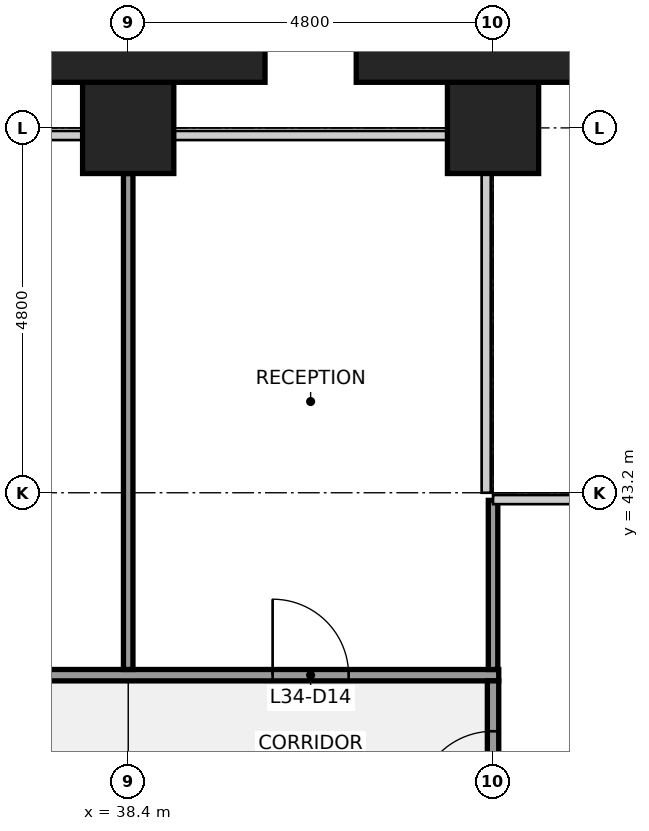
"""IFC4 building model, lengths in metres.
Left out: names, types, materials, properties, quantities, classifications, styles, units other than length and angle.
Written with IfcOpenShell. Run it as: python <this file> out.ifc"""

import sys

from ifc_helpers import new_model, si_unit, direction, frame, frame_2d, origin, origin_2d, place, context, subcontext, project, spatial, rectangle, extrude, element, fill, save


model = new_model("IFC4")
c1 = context("Model", 3, precision=1e-05, world=origin(), true_north=direction((0.0, 1.0)))
c2 = subcontext(c1, "Body", "Model", "MODEL_VIEW")
j1 = project(units=[si_unit("LENGTHUNIT", "METRE"), si_unit("PLANEANGLEUNIT", "RADIAN")], contexts=[c1])
p1 = place(None, origin())
s1 = spatial("IfcSite", under=j1, at=p1, CompositionType="ELEMENT")
p2 = place(p1, origin())
s2 = spatial("IfcBuilding", under=s1, at=p2, CompositionType="ELEMENT")
p3 = place(p2, frame((0.0, 0.0, 156.1)))
s3 = spatial("IfcBuildingStorey", under=s2, at=p3, CompositionType="ELEMENT", Elevation=156.1)
for number, where, z_axis, x_axis in (
    (1, (38.4, 48.0, 0.0), (0.0, 0.0, 1.0), (1.0, 0.0, 0.0)),
    (2, (43.2, 48.0, 0.0), (0.0, 0.0, 1.0), (1.0, 0.0, 0.0)),
):
    element("IfcColumn", number, at=place(p3, frame(where, z_axis=z_axis, x_axis=x_axis)), inside=s3, PredefinedType="COLUMN", context=c2, shape_type="SweptSolid", body=[
        extrude(rectangle(XDim=1.2, YDim=1.2, at=origin_2d()), origin(), (0.0, 0.0, 1.0), 4.0),
    ])
p4 = place(p3, frame((14.325, 40.8, 0.0), z_axis=(0.0, 0.0, 1.0), x_axis=(1.0, 0.0, 0.0)))
e3 = element("IfcWall", 3, at=p4, inside=s3, PredefinedType="PARTITIONING", context=c2, shape_type="SweptSolid", body=[
    extrude(rectangle(XDim=28.95, YDim=0.15, at=frame_2d((14.475, 0.0))), origin(), (0.0, 0.0, 1.0), 2.936),
])
p5 = place(p4, frame((1.975, 0.0, 0.0)))
e4 = element("IfcOpeningElement", 4, at=p5, cuts=e3, PredefinedType="OPENING", context=c2, shape_type="SweptSolid", body=[
    extrude(rectangle(XDim=1.0, YDim=2.1, at=frame_2d((0.5, 1.05))), frame((0.0, 0.085, 0.0), z_axis=(0.0, -1.0, 0.0), x_axis=(1.0, 0.0, 0.0)), (0.0, 0.0, 1.0), 0.17),
])
p6 = place(p4, frame((7.975, 0.0, 0.0)))
e5 = element("IfcOpeningElement", 5, at=p6, cuts=e3, PredefinedType="OPENING", context=c2, shape_type="SweptSolid", body=[
    extrude(rectangle(XDim=1.0, YDim=2.1, at=frame_2d((0.5, 1.05))), frame((0.0, 0.085, 0.0), z_axis=(0.0, -1.0, 0.0), x_axis=(1.0, 0.0, 0.0)), (0.0, 0.0, 1.0), 0.17),
])
p7 = place(p4, frame((15.175, 0.0, 0.0)))
e6 = element("IfcOpeningElement", 6, at=p7, cuts=e3, PredefinedType="OPENING", context=c2, shape_type="SweptSolid", body=[
    extrude(rectangle(XDim=1.0, YDim=2.1, at=frame_2d((0.5, 1.05))), frame((0.0, 0.085, 0.0), z_axis=(0.0, -1.0, 0.0), x_axis=(1.0, 0.0, 0.0)), (0.0, 0.0, 1.0), 0.17),
])
p8 = place(p4, frame((21.175, 0.0, 0.0)))
e7 = element("IfcOpeningElement", 7, at=p8, cuts=e3, PredefinedType="OPENING", context=c2, shape_type="SweptSolid", body=[
    extrude(rectangle(XDim=1.0, YDim=2.1, at=frame_2d((0.5, 1.05))), frame((0.0, 0.085, 0.0), z_axis=(0.0, -1.0, 0.0), x_axis=(1.0, 0.0, 0.0)), (0.0, 0.0, 1.0), 0.17),
])
p9 = place(p4, frame((25.975, 0.0, 0.0)))
e8 = element("IfcOpeningElement", 8, at=p9, cuts=e3, PredefinedType="OPENING", context=c2, shape_type="SweptSolid", body=[
    extrude(rectangle(XDim=1.0, YDim=2.1, at=frame_2d((0.5, 1.05))), frame((0.0, 0.085, 0.0), z_axis=(0.0, -1.0, 0.0), x_axis=(1.0, 0.0, 0.0)), (0.0, 0.0, 1.0), 0.17),
])
p10 = place(p3, frame((38.4, 40.875, 0.0), z_axis=(0.0, 0.0, 1.0), x_axis=(0.0, 1.0, 0.0)))
e9 = element("IfcWall", 9, at=p10, inside=s3, PredefinedType="PARTITIONING", context=c2, shape_type="SweptSolid", body=[
    extrude(rectangle(XDim=6.525, YDim=0.125, at=frame_2d((3.262, 0.0))), origin(), (0.0, 0.0, 1.0), 2.936),
])
p11 = place(p3, frame((43.2, 40.875, 0.0), z_axis=(0.0, 0.0, 1.0), x_axis=(0.0, 1.0, 0.0)))
e10 = element("IfcWall", 10, at=p11, inside=s3, PredefinedType="PARTITIONING", context=c2, shape_type="SweptSolid", body=[
    extrude(rectangle(XDim=2.225, YDim=0.125, at=frame_2d((1.113, 0.0))), origin(), (0.0, 0.0, 1.0), 2.936),
])
p12 = place(p3, frame((43.2, 38.4, 0.0), z_axis=(0.0, 0.0, 1.0), x_axis=(0.0, 1.0, 0.0)))
e11 = element("IfcWall", 11, at=p12, inside=s3, PredefinedType="PARTITIONING", context=c2, shape_type="SweptSolid", body=[
    extrude(rectangle(XDim=2.325, YDim=0.15, at=frame_2d((1.163, 0.0))), origin(), (0.0, 0.0, 1.0), 2.936),
])
p13 = place(p12, frame((0.663, 0.0, 0.0)))
e12 = element("IfcOpeningElement", 12, at=p13, cuts=e11, PredefinedType="OPENING", context=c2, shape_type="SweptSolid", body=[
    extrude(rectangle(XDim=1.0, YDim=2.1, at=frame_2d((0.5, 1.05))), frame((0.0, 0.085, 0.0), z_axis=(0.0, -1.0, 0.0), x_axis=(1.0, 0.0, 0.0)), (0.0, 0.0, 1.0), 0.17),
])
for number, where, z_axis, x_axis in (
    (13, (38.4, 49.05, 0.0), (0.0, 0.0, 1.0), (1.0, 0.0, 0.0)),
    (14, (43.2, 49.05, 0.0), (0.0, 0.0, 1.0), (1.0, 0.0, 0.0)),
):
    element("IfcColumn", number, at=place(p3, frame(where, z_axis=z_axis, x_axis=x_axis)), inside=s3, PredefinedType="PILASTER", context=c2, shape_type="SweptSolid", body=[
        extrude(rectangle(XDim=3.6, YDim=0.9, at=origin_2d()), origin(), (0.0, 0.0, 1.0), 4.0),
    ])
p14 = place(p9, origin())
e15 = element("IfcDoor", 15, at=p14, inside=s3, OperationType="SINGLE_SWING_LEFT", PredefinedType="DOOR", context=c2, shape_type="SweptSolid", body=[
    extrude(rectangle(XDim=1.0, YDim=2.1, at=frame_2d((0.5, 1.05))), frame((0.0, 0.025, 0.0), z_axis=(0.0, -1.0, 0.0), x_axis=(1.0, 0.0, 0.0)), (0.0, 0.0, 1.0), 0.05),
])
fill(e8, e15)
p15 = place(p13, origin())
e16 = element("IfcDoor", 16, at=p15, inside=s3, OperationType="SINGLE_SWING_LEFT", PredefinedType="DOOR", context=c2, shape_type="SweptSolid", body=[
    extrude(rectangle(XDim=1.0, YDim=2.1, at=frame_2d((0.5, 1.05))), frame((0.0, 0.025, 0.0), z_axis=(0.0, -1.0, 0.0), x_axis=(1.0, 0.0, 0.0)), (0.0, 0.0, 1.0), 0.05),
])
fill(e12, e16)
save(model, sys.argv[1])
